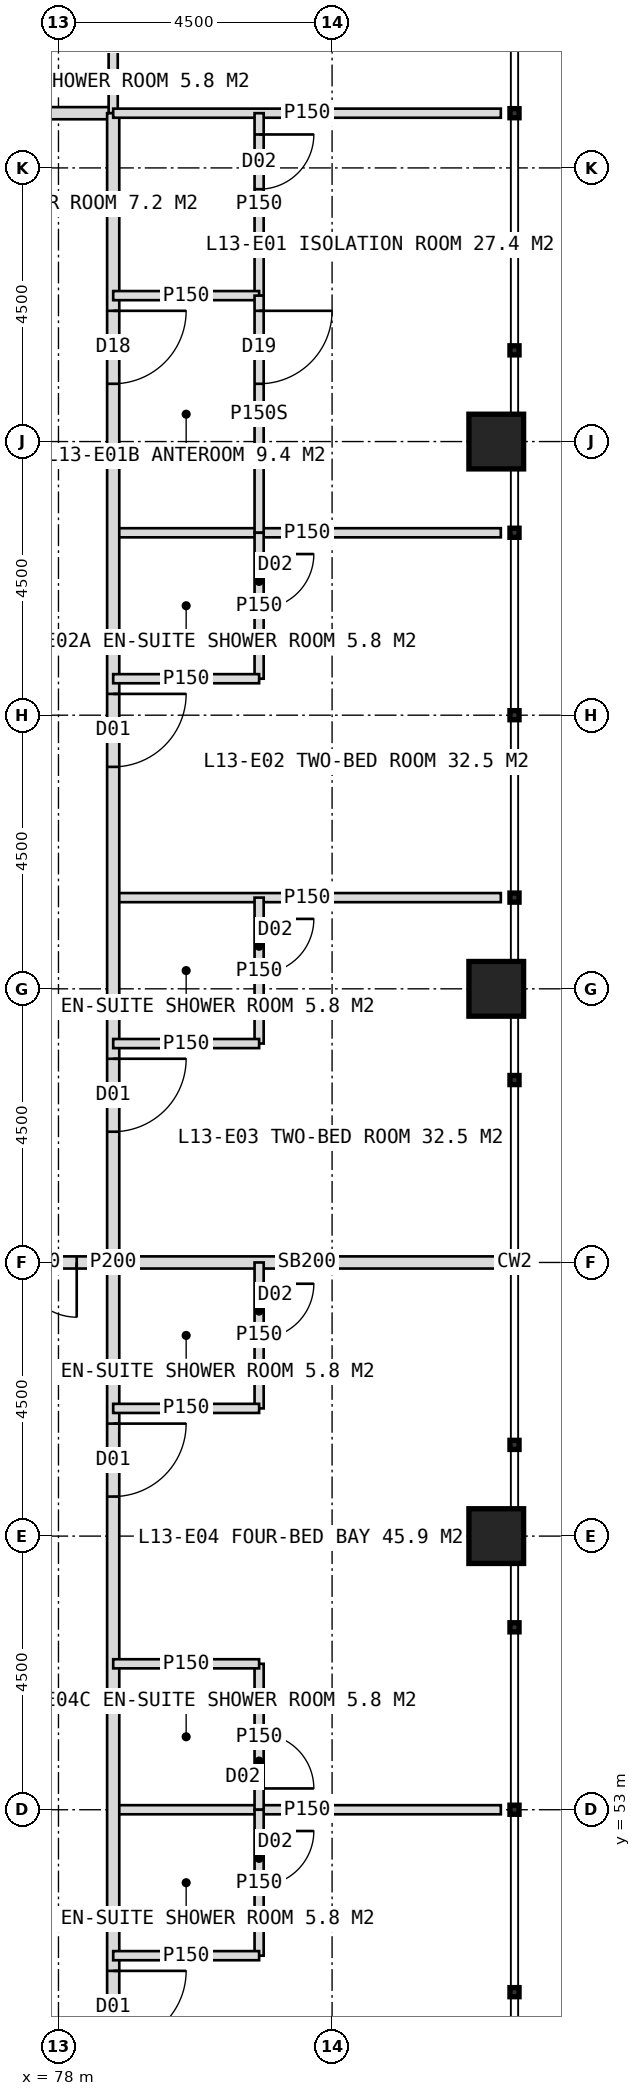
"""IFC4 building model, lengths in metres.
Left out: names, types, materials, properties, quantities, classifications, styles, units other than length and angle.
Written with IfcOpenShell. Run it as: python <this file> out.ifc"""

import sys

from ifc_helpers import new_model, si_unit, direction, frame, frame_2d, origin, origin_2d, place, context, subcontext, project, spatial, rectangle, hollow_rectangle, extrude, element, fill, save


model = new_model("IFC4")
c1 = context("Model", 3, precision=1e-05, world=origin(), true_north=direction((0.0, 1.0)))
c2 = subcontext(c1, "Body", "Model", "MODEL_VIEW")
j1 = project(units=[si_unit("LENGTHUNIT", "METRE"), si_unit("PLANEANGLEUNIT", "RADIAN")], contexts=[c1])
p1 = place(None, origin())
s1 = spatial("IfcSite", under=j1, at=p1, CompositionType="ELEMENT")
p2 = place(p1, origin())
s2 = spatial("IfcBuilding", under=s1, at=p2, CompositionType="ELEMENT")
p3 = place(p2, frame((0.0, 0.0, 59.0)))
s3 = spatial("IfcBuildingStorey", under=s2, at=p3, CompositionType="ELEMENT", Elevation=59.0)
for number, where, z_axis, x_axis in (
    (1, (85.2, 57.5, 0.0), (0.0, 0.0, 1.0), (1.0, 0.0, 0.0)),
    (2, (85.2, 66.5, 0.0), (0.0, 0.0, 1.0), (1.0, 0.0, 0.0)),
    (3, (85.2, 75.5, 0.0), (0.0, 0.0, 1.0), (1.0, 0.0, 0.0)),
):
    element("IfcColumn", number, at=place(p3, frame(where, z_axis=z_axis, x_axis=x_axis)), inside=s3, PredefinedType="COLUMN", context=c2, shape_type="SweptSolid", body=[
        extrude(hollow_rectangle(XDim=0.9, YDim=0.9, WallThickness=0.08, at=origin_2d()), origin(), (0.0, 0.0, 1.0), 4.0),
    ])
p4 = place(p3, frame((41.1, 80.9, 0.0), z_axis=(0.0, 0.0, 1.0), x_axis=(1.0, 0.0, 0.0)))
e4 = element("IfcWall", 4, at=p4, inside=s3, PredefinedType="PARTITIONING", context=c2, shape_type="SweptSolid", body=[
    extrude(rectangle(XDim=37.8, YDim=0.2, at=frame_2d((18.9, 0.0))), origin(), (0.0, 0.0, 1.0), 3.75),
])
p5 = place(p4, frame((3.25, 0.0, 0.0)))
e5 = element("IfcOpeningElement", 5, at=p5, cuts=e4, PredefinedType="OPENING", context=c2, shape_type="SweptSolid", body=[
    extrude(rectangle(XDim=1.2, YDim=2.2, at=frame_2d((0.6, 1.1))), frame((0.0, 0.11, 0.0), z_axis=(0.0, -1.0, 0.0), x_axis=(1.0, 0.0, 0.0)), (0.0, 0.0, 1.0), 0.22),
])
p6 = place(p4, frame((9.55, 0.0, 0.0)))
e6 = element("IfcOpeningElement", 6, at=p6, cuts=e4, PredefinedType="OPENING", context=c2, shape_type="SweptSolid", body=[
    extrude(rectangle(XDim=1.2, YDim=2.2, at=frame_2d((0.6, 1.1))), frame((0.0, 0.11, 0.0), z_axis=(0.0, -1.0, 0.0), x_axis=(1.0, 0.0, 0.0)), (0.0, 0.0, 1.0), 0.22),
])
p7 = place(p4, frame((15.55, 0.0, 0.0)))
e7 = element("IfcOpeningElement", 7, at=p7, cuts=e4, PredefinedType="OPENING", context=c2, shape_type="SweptSolid", body=[
    extrude(rectangle(XDim=1.2, YDim=2.2, at=frame_2d((0.6, 1.1))), frame((0.0, 0.11, 0.0), z_axis=(0.0, -1.0, 0.0), x_axis=(1.0, 0.0, 0.0)), (0.0, 0.0, 1.0), 0.22),
])
p8 = place(p4, frame((21.4, 0.0, 0.0)))
e8 = element("IfcOpeningElement", 8, at=p8, cuts=e4, PredefinedType="OPENING", context=c2, shape_type="SweptSolid", body=[
    extrude(rectangle(XDim=1.0, YDim=2.1, at=frame_2d((0.5, 1.05))), frame((0.0, 0.11, 0.0), z_axis=(0.0, -1.0, 0.0), x_axis=(1.0, 0.0, 0.0)), (0.0, 0.0, 1.0), 0.22),
])
p9 = place(p4, frame((27.55, 0.0, 0.0)))
e9 = element("IfcOpeningElement", 9, at=p9, cuts=e4, PredefinedType="OPENING", context=c2, shape_type="SweptSolid", body=[
    extrude(rectangle(XDim=1.2, YDim=2.2, at=frame_2d((0.6, 1.1))), frame((0.0, 0.11, 0.0), z_axis=(0.0, -1.0, 0.0), x_axis=(1.0, 0.0, 0.0)), (0.0, 0.0, 1.0), 0.22),
])
p10 = place(p3, frame((78.9, 80.9, 0.0), z_axis=(0.0, 0.0, 1.0), x_axis=(0.0, 1.0, 0.0)))
e10 = element("IfcWall", 10, at=p10, inside=s3, PredefinedType="PARTITIONING", context=c2, shape_type="SweptSolid", body=[
    extrude(rectangle(XDim=2.4, YDim=0.15, at=frame_2d((1.2, 0.0))), origin(), (0.0, 0.0, 1.0), 3.75),
])
for number, where, z_axis, x_axis in (
    (11, (78.9, 74.0, 0.0), (0.0, 0.0, 1.0), (1.0, 0.0, 0.0)),
    (12, (78.9, 68.0, 0.0), (0.0, 0.0, 1.0), (1.0, 0.0, 0.0)),
):
    element("IfcWall", number, at=place(p3, frame(where, z_axis=z_axis, x_axis=x_axis)), inside=s3, PredefinedType="PARTITIONING", context=c2, shape_type="SweptSolid", body=[
        extrude(rectangle(XDim=6.375, YDim=0.15, at=frame_2d((3.188, 0.0))), origin(), (0.0, 0.0, 1.0), 3.75),
    ])
p11 = place(p3, frame((78.9, 62.0, 0.0), z_axis=(0.0, 0.0, 1.0), x_axis=(1.0, 0.0, 0.0)))
e13 = element("IfcWall", 13, at=p11, inside=s3, PredefinedType="SOLIDWALL", context=c2, shape_type="SweptSolid", body=[
    extrude(rectangle(XDim=6.375, YDim=0.2, at=frame_2d((3.188, 0.0))), origin(), (0.0, 0.0, 1.0), 2.75),
])
p12 = place(p3, frame((78.9, 53.0, 0.0), z_axis=(0.0, 0.0, 1.0), x_axis=(1.0, 0.0, 0.0)))
e14 = element("IfcWall", 14, at=p12, inside=s3, PredefinedType="PARTITIONING", context=c2, shape_type="SweptSolid", body=[
    extrude(rectangle(XDim=6.375, YDim=0.15, at=frame_2d((3.188, 0.0))), origin(), (0.0, 0.0, 1.0), 3.75),
])
p13 = place(p3, frame((78.9, 80.9, 0.0), z_axis=(0.0, 0.0, 1.0), x_axis=(0.0, -1.0, 0.0)))
e15 = element("IfcWall", 15, at=p13, inside=s3, PredefinedType="PARTITIONING", context=c2, shape_type="SweptSolid", body=[
    extrude(rectangle(XDim=37.8, YDim=0.2, at=frame_2d((18.9, 0.0))), origin(), (0.0, 0.0, 1.0), 3.75),
])
p14 = place(p13, frame((3.25, 0.0, 0.0)))
e16 = element("IfcOpeningElement", 16, at=p14, cuts=e15, PredefinedType="OPENING", context=c2, shape_type="SweptSolid", body=[
    extrude(rectangle(XDim=1.2, YDim=2.2, at=frame_2d((0.6, 1.1))), frame((0.0, 0.11, 0.0), z_axis=(0.0, -1.0, 0.0), x_axis=(1.0, 0.0, 0.0)), (0.0, 0.0, 1.0), 0.22),
])
p15 = place(p13, frame((9.55, 0.0, 0.0)))
e17 = element("IfcOpeningElement", 17, at=p15, cuts=e15, PredefinedType="OPENING", context=c2, shape_type="SweptSolid", body=[
    extrude(rectangle(XDim=1.2, YDim=2.2, at=frame_2d((0.6, 1.1))), frame((0.0, 0.11, 0.0), z_axis=(0.0, -1.0, 0.0), x_axis=(1.0, 0.0, 0.0)), (0.0, 0.0, 1.0), 0.22),
])
p16 = place(p13, frame((15.55, 0.0, 0.0)))
e18 = element("IfcOpeningElement", 18, at=p16, cuts=e15, PredefinedType="OPENING", context=c2, shape_type="SweptSolid", body=[
    extrude(rectangle(XDim=1.2, YDim=2.2, at=frame_2d((0.6, 1.1))), frame((0.0, 0.11, 0.0), z_axis=(0.0, -1.0, 0.0), x_axis=(1.0, 0.0, 0.0)), (0.0, 0.0, 1.0), 0.22),
])
p17 = place(p13, frame((21.55, 0.0, 0.0)))
e19 = element("IfcOpeningElement", 19, at=p17, cuts=e15, PredefinedType="OPENING", context=c2, shape_type="SweptSolid", body=[
    extrude(rectangle(XDim=1.2, YDim=2.2, at=frame_2d((0.6, 1.1))), frame((0.0, 0.11, 0.0), z_axis=(0.0, -1.0, 0.0), x_axis=(1.0, 0.0, 0.0)), (0.0, 0.0, 1.0), 0.22),
])
p18 = place(p13, frame((30.55, 0.0, 0.0)))
e20 = element("IfcOpeningElement", 20, at=p18, cuts=e15, PredefinedType="OPENING", context=c2, shape_type="SweptSolid", body=[
    extrude(rectangle(XDim=1.2, YDim=2.2, at=frame_2d((0.6, 1.1))), frame((0.0, 0.11, 0.0), z_axis=(0.0, -1.0, 0.0), x_axis=(1.0, 0.0, 0.0)), (0.0, 0.0, 1.0), 0.22),
])
p19 = place(p3, frame((78.9, 80.9, 0.0), z_axis=(0.0, 0.0, 1.0), x_axis=(1.0, 0.0, 0.0)))
e21 = element("IfcWall", 21, at=p19, inside=s3, PredefinedType="PARTITIONING", context=c2, shape_type="SweptSolid", body=[
    extrude(rectangle(XDim=6.375, YDim=0.15, at=frame_2d((3.188, 0.0))), origin(), (0.0, 0.0, 1.0), 3.75),
])
p20 = place(p3, frame((81.3, 80.9, 0.0), z_axis=(0.0, 0.0, 1.0), x_axis=(0.0, -1.0, 0.0)))
e22 = element("IfcWall", 22, at=p20, inside=s3, PredefinedType="PARTITIONING", context=c2, shape_type="SweptSolid", body=[
    extrude(rectangle(XDim=3.0, YDim=0.15, at=frame_2d((1.5, 0.0))), origin(), (0.0, 0.0, 1.0), 3.75),
])
p21 = place(p20, frame((0.35, 0.0, 0.0)))
e23 = element("IfcOpeningElement", 23, at=p21, cuts=e22, PredefinedType="OPENING", context=c2, shape_type="SweptSolid", body=[
    extrude(rectangle(XDim=0.9, YDim=2.1, at=frame_2d((0.45, 1.05))), frame((0.0, 0.085, 0.0), z_axis=(0.0, -1.0, 0.0), x_axis=(1.0, 0.0, 0.0)), (0.0, 0.0, 1.0), 0.17),
])
p22 = place(p3, frame((78.9, 77.9, 0.0), z_axis=(0.0, 0.0, 1.0), x_axis=(1.0, 0.0, 0.0)))
e24 = element("IfcWall", 24, at=p22, inside=s3, PredefinedType="PARTITIONING", context=c2, shape_type="SweptSolid", body=[
    extrude(rectangle(XDim=2.4, YDim=0.15, at=frame_2d((1.2, 0.0))), origin(), (0.0, 0.0, 1.0), 3.75),
])
p23 = place(p3, frame((81.3, 77.9, 0.0), z_axis=(0.0, 0.0, 1.0), x_axis=(0.0, -1.0, 0.0)))
e25 = element("IfcWall", 25, at=p23, inside=s3, PredefinedType="PARTITIONING", context=c2, shape_type="SweptSolid", body=[
    extrude(rectangle(XDim=3.9, YDim=0.15, at=frame_2d((1.95, 0.0))), origin(), (0.0, 0.0, 1.0), 3.75),
])
p24 = place(p23, frame((0.25, 0.0, 0.0)))
e26 = element("IfcOpeningElement", 26, at=p24, cuts=e25, PredefinedType="OPENING", context=c2, shape_type="SweptSolid", body=[
    extrude(rectangle(XDim=1.2, YDim=2.2, at=frame_2d((0.6, 1.1))), frame((0.0, 0.085, 0.0), z_axis=(0.0, -1.0, 0.0), x_axis=(1.0, 0.0, 0.0)), (0.0, 0.0, 1.0), 0.17),
])
p25 = place(p3, frame((81.3, 74.0, 0.0), z_axis=(0.0, 0.0, 1.0), x_axis=(0.0, -1.0, 0.0)))
e27 = element("IfcWall", 27, at=p25, inside=s3, PredefinedType="PARTITIONING", context=c2, shape_type="SweptSolid", body=[
    extrude(rectangle(XDim=2.4, YDim=0.15, at=frame_2d((1.2, 0.0))), origin(), (0.0, 0.0, 1.0), 3.75),
])
p26 = place(p25, frame((0.35, 0.0, 0.0)))
e28 = element("IfcOpeningElement", 28, at=p26, cuts=e27, PredefinedType="OPENING", context=c2, shape_type="SweptSolid", body=[
    extrude(rectangle(XDim=0.9, YDim=2.1, at=frame_2d((0.45, 1.05))), frame((0.0, 0.085, 0.0), z_axis=(0.0, -1.0, 0.0), x_axis=(1.0, 0.0, 0.0)), (0.0, 0.0, 1.0), 0.17),
])
p27 = place(p3, frame((78.9, 71.6, 0.0), z_axis=(0.0, 0.0, 1.0), x_axis=(1.0, 0.0, 0.0)))
e29 = element("IfcWall", 29, at=p27, inside=s3, PredefinedType="PARTITIONING", context=c2, shape_type="SweptSolid", body=[
    extrude(rectangle(XDim=2.4, YDim=0.15, at=frame_2d((1.2, 0.0))), origin(), (0.0, 0.0, 1.0), 3.75),
])
p28 = place(p3, frame((81.3, 68.0, 0.0), z_axis=(0.0, 0.0, 1.0), x_axis=(0.0, -1.0, 0.0)))
e30 = element("IfcWall", 30, at=p28, inside=s3, PredefinedType="PARTITIONING", context=c2, shape_type="SweptSolid", body=[
    extrude(rectangle(XDim=2.4, YDim=0.15, at=frame_2d((1.2, 0.0))), origin(), (0.0, 0.0, 1.0), 3.75),
])
p29 = place(p28, frame((0.35, 0.0, 0.0)))
e31 = element("IfcOpeningElement", 31, at=p29, cuts=e30, PredefinedType="OPENING", context=c2, shape_type="SweptSolid", body=[
    extrude(rectangle(XDim=0.9, YDim=2.1, at=frame_2d((0.45, 1.05))), frame((0.0, 0.085, 0.0), z_axis=(0.0, -1.0, 0.0), x_axis=(1.0, 0.0, 0.0)), (0.0, 0.0, 1.0), 0.17),
])
p30 = place(p3, frame((78.9, 65.6, 0.0), z_axis=(0.0, 0.0, 1.0), x_axis=(1.0, 0.0, 0.0)))
e32 = element("IfcWall", 32, at=p30, inside=s3, PredefinedType="PARTITIONING", context=c2, shape_type="SweptSolid", body=[
    extrude(rectangle(XDim=2.4, YDim=0.15, at=frame_2d((1.2, 0.0))), origin(), (0.0, 0.0, 1.0), 3.75),
])
p31 = place(p3, frame((81.3, 62.0, 0.0), z_axis=(0.0, 0.0, 1.0), x_axis=(0.0, -1.0, 0.0)))
e33 = element("IfcWall", 33, at=p31, inside=s3, PredefinedType="PARTITIONING", context=c2, shape_type="SweptSolid", body=[
    extrude(rectangle(XDim=2.4, YDim=0.15, at=frame_2d((1.2, 0.0))), origin(), (0.0, 0.0, 1.0), 3.75),
])
p32 = place(p31, frame((0.35, 0.0, 0.0)))
e34 = element("IfcOpeningElement", 34, at=p32, cuts=e33, PredefinedType="OPENING", context=c2, shape_type="SweptSolid", body=[
    extrude(rectangle(XDim=0.9, YDim=2.1, at=frame_2d((0.45, 1.05))), frame((0.0, 0.085, 0.0), z_axis=(0.0, -1.0, 0.0), x_axis=(1.0, 0.0, 0.0)), (0.0, 0.0, 1.0), 0.17),
])
p33 = place(p3, frame((78.9, 59.6, 0.0), z_axis=(0.0, 0.0, 1.0), x_axis=(1.0, 0.0, 0.0)))
e35 = element("IfcWall", 35, at=p33, inside=s3, PredefinedType="PARTITIONING", context=c2, shape_type="SweptSolid", body=[
    extrude(rectangle(XDim=2.4, YDim=0.15, at=frame_2d((1.2, 0.0))), origin(), (0.0, 0.0, 1.0), 3.75),
])
p34 = place(p3, frame((81.3, 55.4, 0.0), z_axis=(0.0, 0.0, 1.0), x_axis=(0.0, -1.0, 0.0)))
e36 = element("IfcWall", 36, at=p34, inside=s3, PredefinedType="PARTITIONING", context=c2, shape_type="SweptSolid", body=[
    extrude(rectangle(XDim=2.4, YDim=0.15, at=frame_2d((1.2, 0.0))), origin(), (0.0, 0.0, 1.0), 3.75),
])
p35 = place(p34, frame((1.15, 0.0, 0.0)))
e37 = element("IfcOpeningElement", 37, at=p35, cuts=e36, PredefinedType="OPENING", context=c2, shape_type="SweptSolid", body=[
    extrude(rectangle(XDim=0.9, YDim=2.1, at=frame_2d((0.45, 1.05))), frame((0.0, 0.085, 0.0), z_axis=(0.0, -1.0, 0.0), x_axis=(1.0, 0.0, 0.0)), (0.0, 0.0, 1.0), 0.17),
])
p36 = place(p3, frame((78.9, 55.4, 0.0), z_axis=(0.0, 0.0, 1.0), x_axis=(1.0, 0.0, 0.0)))
e38 = element("IfcWall", 38, at=p36, inside=s3, PredefinedType="PARTITIONING", context=c2, shape_type="SweptSolid", body=[
    extrude(rectangle(XDim=2.4, YDim=0.15, at=frame_2d((1.2, 0.0))), origin(), (0.0, 0.0, 1.0), 3.75),
])
p37 = place(p3, frame((81.3, 53.0, 0.0), z_axis=(0.0, 0.0, 1.0), x_axis=(0.0, -1.0, 0.0)))
e39 = element("IfcWall", 39, at=p37, inside=s3, PredefinedType="PARTITIONING", context=c2, shape_type="SweptSolid", body=[
    extrude(rectangle(XDim=2.4, YDim=0.15, at=frame_2d((1.2, 0.0))), origin(), (0.0, 0.0, 1.0), 3.75),
])
p38 = place(p37, frame((0.35, 0.0, 0.0)))
e40 = element("IfcOpeningElement", 40, at=p38, cuts=e39, PredefinedType="OPENING", context=c2, shape_type="SweptSolid", body=[
    extrude(rectangle(XDim=0.9, YDim=2.1, at=frame_2d((0.45, 1.05))), frame((0.0, 0.085, 0.0), z_axis=(0.0, -1.0, 0.0), x_axis=(1.0, 0.0, 0.0)), (0.0, 0.0, 1.0), 0.17),
])
p39 = place(p3, frame((78.9, 50.6, 0.0), z_axis=(0.0, 0.0, 1.0), x_axis=(1.0, 0.0, 0.0)))
e41 = element("IfcWall", 41, at=p39, inside=s3, PredefinedType="PARTITIONING", context=c2, shape_type="SweptSolid", body=[
    extrude(rectangle(XDim=2.4, YDim=0.15, at=frame_2d((1.2, 0.0))), origin(), (0.0, 0.0, 1.0), 3.75),
])
p40 = place(p3, frame((76.2, 62.0, 0.0), z_axis=(0.0, 0.0, 1.0), x_axis=(1.0, 0.0, 0.0)))
e42 = element("IfcWall", 42, at=p40, inside=s3, PredefinedType="SOLIDWALL", context=c2, shape_type="SweptSolid", body=[
    extrude(rectangle(XDim=2.7, YDim=0.2, at=frame_2d((1.35, 0.0))), origin(), (0.0, 0.0, 1.0), 2.75),
])
p41 = place(p40, frame((0.3, 0.0, 0.0)))
e43 = element("IfcOpeningElement", 43, at=p41, cuts=e42, PredefinedType="OPENING", context=c2, shape_type="SweptSolid", body=[
    extrude(rectangle(XDim=1.8, YDim=2.2, at=frame_2d((0.9, 1.1))), frame((0.0, 0.11, 0.0), z_axis=(0.0, -1.0, 0.0), x_axis=(1.0, 0.0, 0.0)), (0.0, 0.0, 1.0), 0.22),
])
p42 = place(p24, origin())
e44 = element("IfcDoor", 44, at=p42, inside=s3, OperationType="SINGLE_SWING_LEFT", PredefinedType="DOOR", context=c2, shape_type="SweptSolid", body=[
    extrude(rectangle(XDim=1.2, YDim=2.2, at=frame_2d((0.6, 1.1))), frame((0.0, 0.025, 0.0), z_axis=(0.0, -1.0, 0.0), x_axis=(1.0, 0.0, 0.0)), (0.0, 0.0, 1.0), 0.05),
])
fill(e26, e44)
p43 = place(p14, origin())
e45 = element("IfcDoor", 45, at=p43, inside=s3, OperationType="SINGLE_SWING_LEFT", PredefinedType="DOOR", context=c2, shape_type="SweptSolid", body=[
    extrude(rectangle(XDim=1.2, YDim=2.2, at=frame_2d((0.6, 1.1))), frame((0.0, 0.025, 0.0), z_axis=(0.0, -1.0, 0.0), x_axis=(1.0, 0.0, 0.0)), (0.0, 0.0, 1.0), 0.05),
])
fill(e16, e45)
p44 = place(p21, origin())
e46 = element("IfcDoor", 46, at=p44, inside=s3, OperationType="SINGLE_SWING_LEFT", PredefinedType="DOOR", context=c2, shape_type="SweptSolid", body=[
    extrude(rectangle(XDim=0.9, YDim=2.1, at=frame_2d((0.45, 1.05))), frame((0.0, 0.025, 0.0), z_axis=(0.0, -1.0, 0.0), x_axis=(1.0, 0.0, 0.0)), (0.0, 0.0, 1.0), 0.05),
])
fill(e23, e46)
p45 = place(p15, origin())
e47 = element("IfcDoor", 47, at=p45, inside=s3, OperationType="SINGLE_SWING_LEFT", PredefinedType="DOOR", context=c2, shape_type="SweptSolid", body=[
    extrude(rectangle(XDim=1.2, YDim=2.2, at=frame_2d((0.6, 1.1))), frame((0.0, 0.025, 0.0), z_axis=(0.0, -1.0, 0.0), x_axis=(1.0, 0.0, 0.0)), (0.0, 0.0, 1.0), 0.05),
])
fill(e17, e47)
p46 = place(p26, origin())
e48 = element("IfcDoor", 48, at=p46, inside=s3, OperationType="SINGLE_SWING_LEFT", PredefinedType="DOOR", context=c2, shape_type="SweptSolid", body=[
    extrude(rectangle(XDim=0.9, YDim=2.1, at=frame_2d((0.45, 1.05))), frame((0.0, 0.025, 0.0), z_axis=(0.0, -1.0, 0.0), x_axis=(1.0, 0.0, 0.0)), (0.0, 0.0, 1.0), 0.05),
])
fill(e28, e48)
p47 = place(p16, origin())
e49 = element("IfcDoor", 49, at=p47, inside=s3, OperationType="SINGLE_SWING_LEFT", PredefinedType="DOOR", context=c2, shape_type="SweptSolid", body=[
    extrude(rectangle(XDim=1.2, YDim=2.2, at=frame_2d((0.6, 1.1))), frame((0.0, 0.025, 0.0), z_axis=(0.0, -1.0, 0.0), x_axis=(1.0, 0.0, 0.0)), (0.0, 0.0, 1.0), 0.05),
])
fill(e18, e49)
p48 = place(p29, origin())
e50 = element("IfcDoor", 50, at=p48, inside=s3, OperationType="SINGLE_SWING_LEFT", PredefinedType="DOOR", context=c2, shape_type="SweptSolid", body=[
    extrude(rectangle(XDim=0.9, YDim=2.1, at=frame_2d((0.45, 1.05))), frame((0.0, 0.025, 0.0), z_axis=(0.0, -1.0, 0.0), x_axis=(1.0, 0.0, 0.0)), (0.0, 0.0, 1.0), 0.05),
])
fill(e31, e50)
p49 = place(p17, origin())
e51 = element("IfcDoor", 51, at=p49, inside=s3, OperationType="SINGLE_SWING_LEFT", PredefinedType="DOOR", context=c2, shape_type="SweptSolid", body=[
    extrude(rectangle(XDim=1.2, YDim=2.2, at=frame_2d((0.6, 1.1))), frame((0.0, 0.025, 0.0), z_axis=(0.0, -1.0, 0.0), x_axis=(1.0, 0.0, 0.0)), (0.0, 0.0, 1.0), 0.05),
])
fill(e19, e51)
p50 = place(p32, origin())
e52 = element("IfcDoor", 52, at=p50, inside=s3, OperationType="SINGLE_SWING_LEFT", PredefinedType="DOOR", context=c2, shape_type="SweptSolid", body=[
    extrude(rectangle(XDim=0.9, YDim=2.1, at=frame_2d((0.45, 1.05))), frame((0.0, 0.025, 0.0), z_axis=(0.0, -1.0, 0.0), x_axis=(1.0, 0.0, 0.0)), (0.0, 0.0, 1.0), 0.05),
])
fill(e34, e52)
p51 = place(p35, origin())
e53 = element("IfcDoor", 53, at=p51, inside=s3, OperationType="SINGLE_SWING_RIGHT", PredefinedType="DOOR", context=c2, shape_type="SweptSolid", body=[
    extrude(rectangle(XDim=0.9, YDim=2.1, at=frame_2d((0.45, 1.05))), frame((0.0, 0.025, 0.0), z_axis=(0.0, -1.0, 0.0), x_axis=(1.0, 0.0, 0.0)), (0.0, 0.0, 1.0), 0.05),
])
fill(e37, e53)
p52 = place(p18, origin())
e54 = element("IfcDoor", 54, at=p52, inside=s3, OperationType="SINGLE_SWING_LEFT", PredefinedType="DOOR", context=c2, shape_type="SweptSolid", body=[
    extrude(rectangle(XDim=1.2, YDim=2.2, at=frame_2d((0.6, 1.1))), frame((0.0, 0.025, 0.0), z_axis=(0.0, -1.0, 0.0), x_axis=(1.0, 0.0, 0.0)), (0.0, 0.0, 1.0), 0.05),
])
fill(e20, e54)
p53 = place(p38, origin())
e55 = element("IfcDoor", 55, at=p53, inside=s3, OperationType="SINGLE_SWING_LEFT", PredefinedType="DOOR", context=c2, shape_type="SweptSolid", body=[
    extrude(rectangle(XDim=0.9, YDim=2.1, at=frame_2d((0.45, 1.05))), frame((0.0, 0.025, 0.0), z_axis=(0.0, -1.0, 0.0), x_axis=(1.0, 0.0, 0.0)), (0.0, 0.0, 1.0), 0.05),
])
fill(e40, e55)
p54 = place(p41, origin())
e56 = element("IfcDoor", 56, at=p54, inside=s3, OperationType="DOUBLE_DOOR_DOUBLE_SWING", PredefinedType="DOOR", context=c2, shape_type="SweptSolid", body=[
    extrude(rectangle(XDim=1.8, YDim=2.2, at=frame_2d((0.9, 1.1))), frame((0.0, 0.025, 0.0), z_axis=(0.0, -1.0, 0.0), x_axis=(1.0, 0.0, 0.0)), (0.0, 0.0, 1.0), 0.05),
])
fill(e43, e56)
save(model, sys.argv[1])
